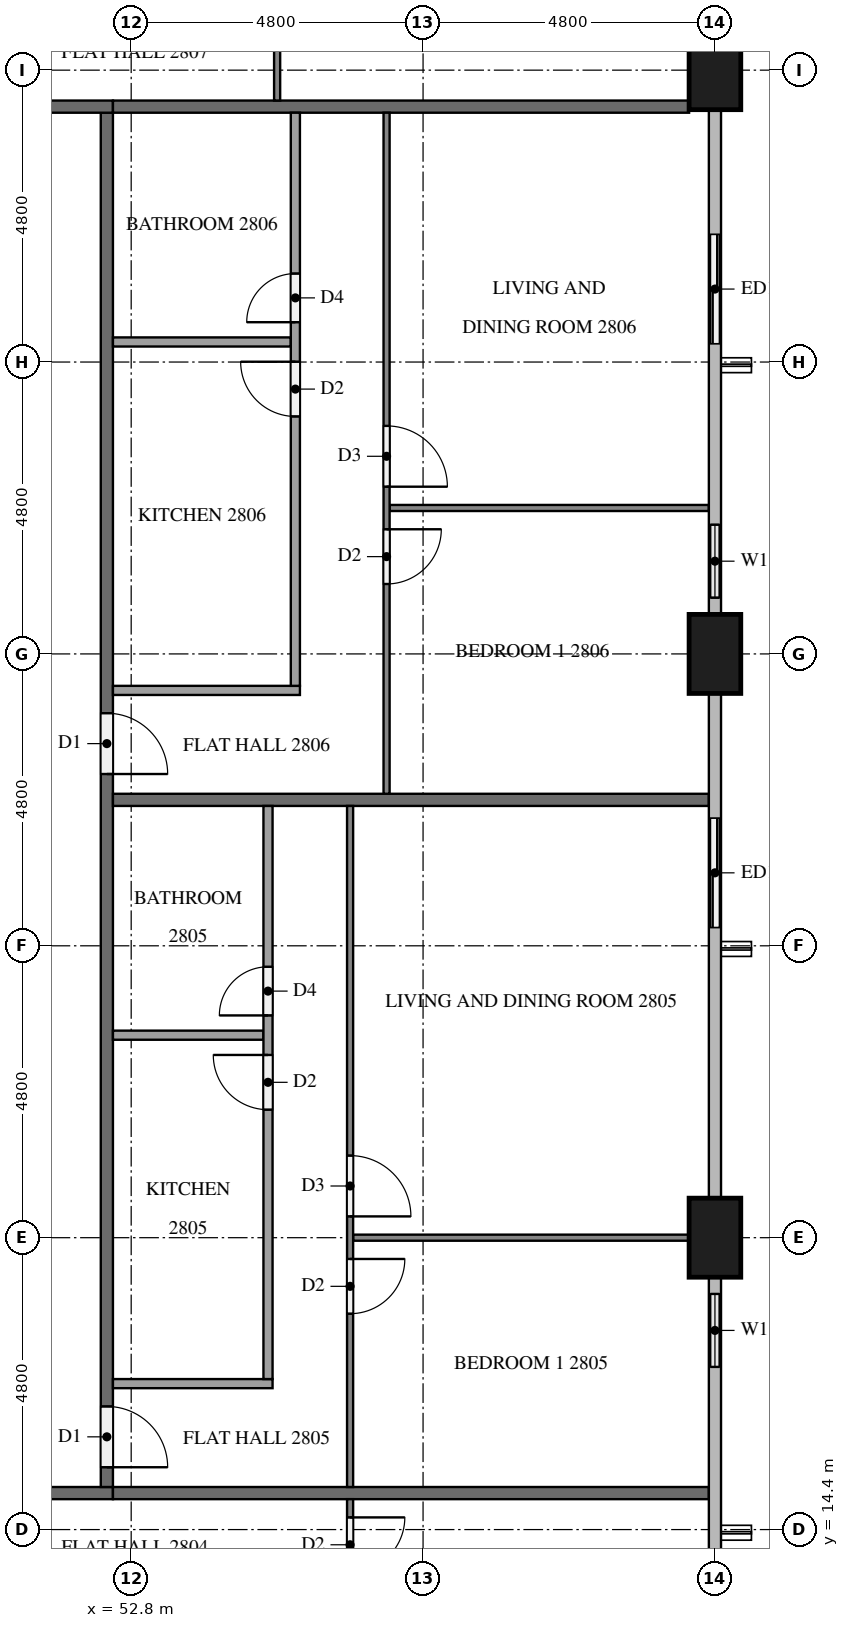
"""IFC4 building model, lengths in metres.
Left out: names, types, materials, properties, quantities, classifications, styles, units other than length and angle.
Written with IfcOpenShell. Run it as: python <this file> out.ifc"""

import sys

from ifc_helpers import new_model, si_unit, direction, frame, frame_2d, origin, origin_2d, place, context, subcontext, project, spatial, rectangle, extrude, element, fill, save


model = new_model("IFC4")
c1 = context("Model", 3, precision=1e-05, world=origin(), true_north=direction((0.0, 1.0)))
c2 = subcontext(c1, "Body", "Model", "MODEL_VIEW")
j1 = project(units=[si_unit("LENGTHUNIT", "METRE"), si_unit("PLANEANGLEUNIT", "RADIAN")], contexts=[c1])
p1 = place(None, origin())
s1 = spatial("IfcSite", under=j1, at=p1, CompositionType="ELEMENT")
p2 = place(p1, origin())
s2 = spatial("IfcBuilding", under=s1, at=p2, CompositionType="ELEMENT")
p3 = place(p2, frame((0.0, 0.0, 110.2)))
s3 = spatial("IfcBuildingStorey", under=s2, at=p3, CompositionType="ELEMENT", Elevation=110.2)
for number, where, z_axis, x_axis in (
    (1, (62.4, 19.2, 0.0), (0.0, 0.0, 1.0), (0.0, 1.0, 0.0)),
    (2, (62.4, 28.8, 0.0), (0.0, 0.0, 1.0), (0.0, 1.0, 0.0)),
    (3, (62.4, 38.4, 0.0), (0.0, 0.0, 1.0), (0.0, 1.0, 0.0)),
):
    element("IfcColumn", number, at=place(p3, frame(where, z_axis=z_axis, x_axis=x_axis)), inside=s3, PredefinedType="COLUMN", context=c2, shape_type="SweptSolid", body=[
        extrude(rectangle(XDim=1.3, YDim=0.85, at=origin_2d()), origin(), (0.0, 0.0, 1.0), 3.1),
    ])
p4 = place(p3, frame((62.4, 16.8, 0.0), z_axis=(0.0, 0.0, 1.0), x_axis=(0.0, 1.0, 0.0)))
e4 = element("IfcWall", 4, at=p4, inside=s3, PredefinedType="SOLIDWALL", context=c2, shape_type="SweptSolid", body=[
    extrude(rectangle(XDim=1.75, YDim=0.15, at=frame_2d((0.875, 0.0))), origin(), (0.0, 0.0, 1.0), 3.1),
])
p5 = place(p4, frame((0.275, 0.0, 0.9)))
e5 = element("IfcOpeningElement", 5, at=p5, cuts=e4, PredefinedType="OPENING", context=c2, shape_type="SweptSolid", body=[
    extrude(rectangle(XDim=1.2, YDim=1.4, at=frame_2d((0.6, 0.7))), frame((0.0, 0.085, 0.0), z_axis=(0.0, -1.0, 0.0), x_axis=(1.0, 0.0, 0.0)), (0.0, 0.0, 1.0), 0.17),
])
p6 = place(p3, frame((62.4, 24.0, 0.0), z_axis=(0.0, 0.0, 1.0), x_axis=(0.0, 1.0, 0.0)))
e6 = element("IfcWall", 6, at=p6, inside=s3, PredefinedType="SOLIDWALL", context=c2, shape_type="SweptSolid", body=[
    extrude(rectangle(XDim=2.4, YDim=0.15, at=frame_2d((1.2, 0.0))), origin(), (0.0, 0.0, 1.0), 3.1),
])
p7 = place(p6, frame((0.3, 0.0, 0.0)))
e7 = element("IfcOpeningElement", 7, at=p7, cuts=e6, PredefinedType="OPENING", context=c2, shape_type="SweptSolid", body=[
    extrude(rectangle(XDim=1.8, YDim=2.4, at=frame_2d((0.9, 1.2))), frame((0.0, 0.085, 0.0), z_axis=(0.0, -1.0, 0.0), x_axis=(1.0, 0.0, 0.0)), (0.0, 0.0, 1.0), 0.17),
])
p8 = place(p3, frame((62.4, 29.45, 0.0), z_axis=(0.0, 0.0, 1.0), x_axis=(0.0, 1.0, 0.0)))
e8 = element("IfcWall", 8, at=p8, inside=s3, PredefinedType="SOLIDWALL", context=c2, shape_type="SweptSolid", body=[
    extrude(rectangle(XDim=1.75, YDim=0.15, at=frame_2d((0.875, 0.0))), origin(), (0.0, 0.0, 1.0), 3.1),
])
p9 = place(p8, frame((0.275, 0.0, 0.9)))
e9 = element("IfcOpeningElement", 9, at=p9, cuts=e8, PredefinedType="OPENING", context=c2, shape_type="SweptSolid", body=[
    extrude(rectangle(XDim=1.2, YDim=1.4, at=frame_2d((0.6, 0.7))), frame((0.0, 0.085, 0.0), z_axis=(0.0, -1.0, 0.0), x_axis=(1.0, 0.0, 0.0)), (0.0, 0.0, 1.0), 0.17),
])
p10 = place(p3, frame((62.4, 33.6, 0.0), z_axis=(0.0, 0.0, 1.0), x_axis=(0.0, 1.0, 0.0)))
e10 = element("IfcWall", 10, at=p10, inside=s3, PredefinedType="SOLIDWALL", context=c2, shape_type="SweptSolid", body=[
    extrude(rectangle(XDim=2.4, YDim=0.15, at=frame_2d((1.2, 0.0))), origin(), (0.0, 0.0, 1.0), 3.1),
])
p11 = place(p10, frame((0.3, 0.0, 0.0)))
e11 = element("IfcOpeningElement", 11, at=p11, cuts=e10, PredefinedType="OPENING", context=c2, shape_type="SweptSolid", body=[
    extrude(rectangle(XDim=1.8, YDim=2.4, at=frame_2d((0.9, 1.2))), frame((0.0, 0.085, 0.0), z_axis=(0.0, -1.0, 0.0), x_axis=(1.0, 0.0, 0.0)), (0.0, 0.0, 1.0), 0.17),
])
p12 = place(p3, frame((50.3, 15.0, 0.0), z_axis=(0.0, 0.0, 1.0), x_axis=(1.0, 0.0, 0.0)))
e12 = element("IfcWall", 12, at=p12, inside=s3, PredefinedType="PARTITIONING", context=c2, shape_type="SweptSolid", body=[
    extrude(rectangle(XDim=2.2, YDim=0.2, at=frame_2d((1.1, 0.0))), origin(), (0.0, 0.0, 1.0), 3.1),
])
p13 = place(p3, frame((52.4, 37.7, 0.0), z_axis=(0.0, 0.0, 1.0), x_axis=(0.0, -1.0, 0.0)))
e13 = element("IfcWall", 13, at=p13, inside=s3, PredefinedType="PARTITIONING", context=c2, shape_type="SweptSolid", body=[
    extrude(rectangle(XDim=22.6, YDim=0.2, at=frame_2d((11.3, 0.0))), origin(), (0.0, 0.0, 1.0), 3.1),
])
p14 = place(p13, frame((21.275, 0.0, 0.0)))
e14 = element("IfcOpeningElement", 14, at=p14, cuts=e13, PredefinedType="OPENING", context=c2, shape_type="SweptSolid", body=[
    extrude(rectangle(XDim=1.0, YDim=2.1, at=frame_2d((0.5, 1.05))), frame((0.0, 0.11, 0.0), z_axis=(0.0, -1.0, 0.0), x_axis=(1.0, 0.0, 0.0)), (0.0, 0.0, 1.0), 0.22),
])
p15 = place(p13, frame((9.875, 0.0, 0.0)))
e15 = element("IfcOpeningElement", 15, at=p15, cuts=e13, PredefinedType="OPENING", context=c2, shape_type="SweptSolid", body=[
    extrude(rectangle(XDim=1.0, YDim=2.1, at=frame_2d((0.5, 1.05))), frame((0.0, 0.11, 0.0), z_axis=(0.0, -1.0, 0.0), x_axis=(1.0, 0.0, 0.0)), (0.0, 0.0, 1.0), 0.22),
])
p16 = place(p3, frame((52.5, 37.8, 0.0), z_axis=(0.0, 0.0, 1.0), x_axis=(-1.0, 0.0, 0.0)))
e16 = element("IfcWall", 16, at=p16, inside=s3, PredefinedType="PARTITIONING", context=c2, shape_type="SweptSolid", body=[
    extrude(rectangle(XDim=2.2, YDim=0.2, at=frame_2d((1.1, 0.0))), origin(), (0.0, 0.0, 1.0), 3.1),
])
for number, where, z_axis, x_axis in (
    (17, (52.5, 15.0, 0.0), (0.0, 0.0, 1.0), (1.0, 0.0, 0.0)),
    (18, (52.5, 26.4, 0.0), (0.0, 0.0, 1.0), (1.0, 0.0, 0.0)),
):
    element("IfcWall", number, at=place(p3, frame(where, z_axis=z_axis, x_axis=x_axis)), inside=s3, PredefinedType="PARTITIONING", context=c2, shape_type="SweptSolid", body=[
        extrude(rectangle(XDim=9.8, YDim=0.2, at=frame_2d((4.9, 0.0))), origin(), (0.0, 0.0, 1.0), 3.1),
    ])
p17 = place(p3, frame((52.5, 37.8, 0.0), z_axis=(0.0, 0.0, 1.0), x_axis=(1.0, 0.0, 0.0)))
e19 = element("IfcWall", 19, at=p17, inside=s3, PredefinedType="PARTITIONING", context=c2, shape_type="SweptSolid", body=[
    extrude(rectangle(XDim=9.475, YDim=0.2, at=frame_2d((4.738, 0.0))), origin(), (0.0, 0.0, 1.0), 3.1),
])
p18 = place(p3, frame((56.4, 14.9, 0.0), z_axis=(0.0, 0.0, 1.0), x_axis=(0.0, -1.0, 0.0)))
e20 = element("IfcWall", 20, at=p18, inside=s3, PredefinedType="PARTITIONING", context=c2, shape_type="SweptSolid", body=[
    extrude(rectangle(XDim=10.0, YDim=0.1, at=frame_2d((5.0, 0.0))), origin(), (0.0, 0.0, 1.0), 3.1),
])
p19 = place(p18, frame((0.3, 0.0, 0.0)))
e21 = element("IfcOpeningElement", 21, at=p19, cuts=e20, PredefinedType="OPENING", context=c2, shape_type="SweptSolid", body=[
    extrude(rectangle(XDim=0.9, YDim=2.1, at=frame_2d((0.45, 1.05))), frame((0.0, 0.06, 0.0), z_axis=(0.0, -1.0, 0.0), x_axis=(1.0, 0.0, 0.0)), (0.0, 0.0, 1.0), 0.12),
])
p20 = place(p18, frame((8.5, 0.0, 0.0)))
e22 = element("IfcOpeningElement", 22, at=p20, cuts=e20, PredefinedType="OPENING", context=c2, shape_type="SweptSolid", body=[
    extrude(rectangle(XDim=1.0, YDim=2.1, at=frame_2d((0.5, 1.05))), frame((0.0, 0.06, 0.0), z_axis=(0.0, -1.0, 0.0), x_axis=(1.0, 0.0, 0.0)), (0.0, 0.0, 1.0), 0.12),
])
p21 = place(p3, frame((56.45, 19.2, 0.0), z_axis=(0.0, 0.0, 1.0), x_axis=(1.0, 0.0, 0.0)))
e23 = element("IfcWall", 23, at=p21, inside=s3, PredefinedType="PARTITIONING", context=c2, shape_type="SweptSolid", body=[
    extrude(rectangle(XDim=5.525, YDim=0.1, at=frame_2d((2.763, 0.0))), origin(), (0.0, 0.0, 1.0), 3.1),
])
p22 = place(p3, frame((56.4, 26.3, 0.0), z_axis=(0.0, 0.0, 1.0), x_axis=(0.0, -1.0, 0.0)))
e24 = element("IfcWall", 24, at=p22, inside=s3, PredefinedType="PARTITIONING", context=c2, shape_type="SweptSolid", body=[
    extrude(rectangle(XDim=11.2, YDim=0.1, at=frame_2d((5.6, 0.0))), origin(), (0.0, 0.0, 1.0), 3.1),
])
p23 = place(p22, frame((7.45, 0.0, 0.0)))
e25 = element("IfcOpeningElement", 25, at=p23, cuts=e24, PredefinedType="OPENING", context=c2, shape_type="SweptSolid", body=[
    extrude(rectangle(XDim=0.9, YDim=2.1, at=frame_2d((0.45, 1.05))), frame((0.0, 0.06, 0.0), z_axis=(0.0, -1.0, 0.0), x_axis=(1.0, 0.0, 0.0)), (0.0, 0.0, 1.0), 0.12),
])
p24 = place(p22, frame((5.75, 0.0, 0.0)))
e26 = element("IfcOpeningElement", 26, at=p24, cuts=e24, PredefinedType="OPENING", context=c2, shape_type="SweptSolid", body=[
    extrude(rectangle(XDim=1.0, YDim=2.1, at=frame_2d((0.5, 1.05))), frame((0.0, 0.06, 0.0), z_axis=(0.0, -1.0, 0.0), x_axis=(1.0, 0.0, 0.0)), (0.0, 0.0, 1.0), 0.12),
])
p25 = place(p3, frame((52.5, 22.53, 0.0), z_axis=(0.0, 0.0, 1.0), x_axis=(1.0, 0.0, 0.0)))
e27 = element("IfcWall", 27, at=p25, inside=s3, PredefinedType="PARTITIONING", context=c2, shape_type="SweptSolid", body=[
    extrude(rectangle(XDim=2.475, YDim=0.15, at=frame_2d((1.238, 0.0))), origin(), (0.0, 0.0, 1.0), 3.1),
])
p26 = place(p3, frame((52.5, 16.8, 0.0), z_axis=(0.0, 0.0, 1.0), x_axis=(1.0, 0.0, 0.0)))
e28 = element("IfcWall", 28, at=p26, inside=s3, PredefinedType="PARTITIONING", context=c2, shape_type="SweptSolid", body=[
    extrude(rectangle(XDim=2.625, YDim=0.15, at=frame_2d((1.312, 0.0))), origin(), (0.0, 0.0, 1.0), 3.1),
])
p27 = place(p3, frame((55.05, 16.875, 0.0), z_axis=(0.0, 0.0, 1.0), x_axis=(0.0, 1.0, 0.0)))
e29 = element("IfcWall", 29, at=p27, inside=s3, PredefinedType="PARTITIONING", context=c2, shape_type="SweptSolid", body=[
    extrude(rectangle(XDim=9.425, YDim=0.15, at=frame_2d((4.712, 0.0))), origin(), (0.0, 0.0, 1.0), 3.1),
])
p28 = place(p27, frame((4.43, 0.0, 0.0)))
e30 = element("IfcOpeningElement", 30, at=p28, cuts=e29, PredefinedType="OPENING", context=c2, shape_type="SweptSolid", body=[
    extrude(rectangle(XDim=0.9, YDim=2.1, at=frame_2d((0.45, 1.05))), frame((0.0, 0.085, 0.0), z_axis=(0.0, -1.0, 0.0), x_axis=(1.0, 0.0, 0.0)), (0.0, 0.0, 1.0), 0.17),
])
p29 = place(p27, frame((5.98, 0.0, 0.0)))
e31 = element("IfcOpeningElement", 31, at=p29, cuts=e29, PredefinedType="OPENING", context=c2, shape_type="SweptSolid", body=[
    extrude(rectangle(XDim=0.8, YDim=2.1, at=frame_2d((0.4, 1.05))), frame((0.0, 0.085, 0.0), z_axis=(0.0, -1.0, 0.0), x_axis=(1.0, 0.0, 0.0)), (0.0, 0.0, 1.0), 0.17),
])
p30 = place(p3, frame((57.05, 31.2, 0.0), z_axis=(0.0, 0.0, 1.0), x_axis=(1.0, 0.0, 0.0)))
e32 = element("IfcWall", 32, at=p30, inside=s3, PredefinedType="PARTITIONING", context=c2, shape_type="SweptSolid", body=[
    extrude(rectangle(XDim=5.25, YDim=0.1, at=frame_2d((2.625, 0.0))), origin(), (0.0, 0.0, 1.0), 3.1),
])
p31 = place(p3, frame((57.0, 37.7, 0.0), z_axis=(0.0, 0.0, 1.0), x_axis=(0.0, -1.0, 0.0)))
e33 = element("IfcWall", 33, at=p31, inside=s3, PredefinedType="PARTITIONING", context=c2, shape_type="SweptSolid", body=[
    extrude(rectangle(XDim=11.2, YDim=0.1, at=frame_2d((5.6, 0.0))), origin(), (0.0, 0.0, 1.0), 3.1),
])
p32 = place(p31, frame((6.85, 0.0, 0.0)))
e34 = element("IfcOpeningElement", 34, at=p32, cuts=e33, PredefinedType="OPENING", context=c2, shape_type="SweptSolid", body=[
    extrude(rectangle(XDim=0.9, YDim=2.1, at=frame_2d((0.45, 1.05))), frame((0.0, 0.06, 0.0), z_axis=(0.0, -1.0, 0.0), x_axis=(1.0, 0.0, 0.0)), (0.0, 0.0, 1.0), 0.12),
])
p33 = place(p31, frame((5.15, 0.0, 0.0)))
e35 = element("IfcOpeningElement", 35, at=p33, cuts=e33, PredefinedType="OPENING", context=c2, shape_type="SweptSolid", body=[
    extrude(rectangle(XDim=1.0, YDim=2.1, at=frame_2d((0.5, 1.05))), frame((0.0, 0.06, 0.0), z_axis=(0.0, -1.0, 0.0), x_axis=(1.0, 0.0, 0.0)), (0.0, 0.0, 1.0), 0.12),
])
p34 = place(p3, frame((52.5, 33.93, 0.0), z_axis=(0.0, 0.0, 1.0), x_axis=(1.0, 0.0, 0.0)))
e36 = element("IfcWall", 36, at=p34, inside=s3, PredefinedType="PARTITIONING", context=c2, shape_type="SweptSolid", body=[
    extrude(rectangle(XDim=2.925, YDim=0.15, at=frame_2d((1.462, 0.0))), origin(), (0.0, 0.0, 1.0), 3.1),
])
p35 = place(p3, frame((52.5, 28.2, 0.0), z_axis=(0.0, 0.0, 1.0), x_axis=(1.0, 0.0, 0.0)))
e37 = element("IfcWall", 37, at=p35, inside=s3, PredefinedType="PARTITIONING", context=c2, shape_type="SweptSolid", body=[
    extrude(rectangle(XDim=3.075, YDim=0.15, at=frame_2d((1.538, 0.0))), origin(), (0.0, 0.0, 1.0), 3.1),
])
p36 = place(p3, frame((55.5, 28.275, 0.0), z_axis=(0.0, 0.0, 1.0), x_axis=(0.0, 1.0, 0.0)))
e38 = element("IfcWall", 38, at=p36, inside=s3, PredefinedType="PARTITIONING", context=c2, shape_type="SweptSolid", body=[
    extrude(rectangle(XDim=9.425, YDim=0.15, at=frame_2d((4.712, 0.0))), origin(), (0.0, 0.0, 1.0), 3.1),
])
p37 = place(p36, frame((4.43, 0.0, 0.0)))
e39 = element("IfcOpeningElement", 39, at=p37, cuts=e38, PredefinedType="OPENING", context=c2, shape_type="SweptSolid", body=[
    extrude(rectangle(XDim=0.9, YDim=2.1, at=frame_2d((0.45, 1.05))), frame((0.0, 0.085, 0.0), z_axis=(0.0, -1.0, 0.0), x_axis=(1.0, 0.0, 0.0)), (0.0, 0.0, 1.0), 0.17),
])
p38 = place(p36, frame((5.98, 0.0, 0.0)))
e40 = element("IfcOpeningElement", 40, at=p38, cuts=e38, PredefinedType="OPENING", context=c2, shape_type="SweptSolid", body=[
    extrude(rectangle(XDim=0.8, YDim=2.1, at=frame_2d((0.4, 1.05))), frame((0.0, 0.085, 0.0), z_axis=(0.0, -1.0, 0.0), x_axis=(1.0, 0.0, 0.0)), (0.0, 0.0, 1.0), 0.17),
])
p39 = place(p3, frame((55.2, 52.7, 0.0), z_axis=(0.0, 0.0, 1.0), x_axis=(0.0, -1.0, 0.0)))
e41 = element("IfcWall", 41, at=p39, inside=s3, PredefinedType="PARTITIONING", context=c2, shape_type="SweptSolid", body=[
    extrude(rectangle(XDim=14.8, YDim=0.1, at=frame_2d((7.4, 0.0))), origin(), (0.0, 0.0, 1.0), 3.1),
])
p40 = place(p39, frame((9.85, 0.0, 0.0)))
e42 = element("IfcOpeningElement", 42, at=p40, cuts=e41, PredefinedType="OPENING", context=c2, shape_type="SweptSolid", body=[
    extrude(rectangle(XDim=0.9, YDim=2.1, at=frame_2d((0.45, 1.05))), frame((0.0, 0.06, 0.0), z_axis=(0.0, -1.0, 0.0), x_axis=(1.0, 0.0, 0.0)), (0.0, 0.0, 1.0), 0.12),
])
p41 = place(p39, frame((8.25, 0.0, 0.0)))
e43 = element("IfcOpeningElement", 43, at=p41, cuts=e41, PredefinedType="OPENING", context=c2, shape_type="SweptSolid", body=[
    extrude(rectangle(XDim=0.9, YDim=2.1, at=frame_2d((0.45, 1.05))), frame((0.0, 0.06, 0.0), z_axis=(0.0, -1.0, 0.0), x_axis=(1.0, 0.0, 0.0)), (0.0, 0.0, 1.0), 0.12),
])
p42 = place(p39, frame((0.3, 0.0, 0.0)))
e44 = element("IfcOpeningElement", 44, at=p42, cuts=e41, PredefinedType="OPENING", context=c2, shape_type="SweptSolid", body=[
    extrude(rectangle(XDim=1.0, YDim=2.1, at=frame_2d((0.5, 1.05))), frame((0.0, 0.06, 0.0), z_axis=(0.0, -1.0, 0.0), x_axis=(1.0, 0.0, 0.0)), (0.0, 0.0, 1.0), 0.12),
])
p43 = place(p5, origin())
e45 = element("IfcWindow", 45, at=p43, inside=s3, PartitioningType="SINGLE_PANEL", PredefinedType="WINDOW", context=c2, shape_type="SweptSolid", body=[
    extrude(rectangle(XDim=1.2, YDim=1.4, at=frame_2d((0.6, 0.7))), frame((0.0, 0.03, 0.0), z_axis=(0.0, -1.0, 0.0), x_axis=(1.0, 0.0, 0.0)), (0.0, 0.0, 1.0), 0.06),
])
fill(e5, e45)
p44 = place(p7, origin())
e46 = element("IfcDoor", 46, at=p44, inside=s3, OperationType="SLIDING_TO_LEFT", PredefinedType="DOOR", context=c2, shape_type="SweptSolid", body=[
    extrude(rectangle(XDim=1.8, YDim=2.4, at=frame_2d((0.9, 1.2))), frame((0.0, 0.025, 0.0), z_axis=(0.0, -1.0, 0.0), x_axis=(1.0, 0.0, 0.0)), (0.0, 0.0, 1.0), 0.05),
])
fill(e7, e46)
p45 = place(p9, origin())
e47 = element("IfcWindow", 47, at=p45, inside=s3, PartitioningType="SINGLE_PANEL", PredefinedType="WINDOW", context=c2, shape_type="SweptSolid", body=[
    extrude(rectangle(XDim=1.2, YDim=1.4, at=frame_2d((0.6, 0.7))), frame((0.0, 0.03, 0.0), z_axis=(0.0, -1.0, 0.0), x_axis=(1.0, 0.0, 0.0)), (0.0, 0.0, 1.0), 0.06),
])
fill(e9, e47)
p46 = place(p11, origin())
e48 = element("IfcDoor", 48, at=p46, inside=s3, OperationType="SLIDING_TO_RIGHT", PredefinedType="DOOR", context=c2, shape_type="SweptSolid", body=[
    extrude(rectangle(XDim=1.8, YDim=2.4, at=frame_2d((0.9, 1.2))), frame((0.0, 0.025, 0.0), z_axis=(0.0, -1.0, 0.0), x_axis=(1.0, 0.0, 0.0)), (0.0, 0.0, 1.0), 0.05),
])
fill(e11, e48)
p47 = place(p14, origin())
e49 = element("IfcDoor", 49, at=p47, inside=s3, OperationType="SINGLE_SWING_RIGHT", PredefinedType="DOOR", context=c2, shape_type="SweptSolid", body=[
    extrude(rectangle(XDim=1.0, YDim=2.1, at=frame_2d((0.5, 1.05))), frame((0.0, 0.025, 0.0), z_axis=(0.0, -1.0, 0.0), x_axis=(1.0, 0.0, 0.0)), (0.0, 0.0, 1.0), 0.05),
])
fill(e14, e49)
p48 = place(p15, origin())
e50 = element("IfcDoor", 50, at=p48, inside=s3, OperationType="SINGLE_SWING_RIGHT", PredefinedType="DOOR", context=c2, shape_type="SweptSolid", body=[
    extrude(rectangle(XDim=1.0, YDim=2.1, at=frame_2d((0.5, 1.05))), frame((0.0, 0.025, 0.0), z_axis=(0.0, -1.0, 0.0), x_axis=(1.0, 0.0, 0.0)), (0.0, 0.0, 1.0), 0.05),
])
fill(e15, e50)
p49 = place(p19, origin())
e51 = element("IfcDoor", 51, at=p49, inside=s3, OperationType="SINGLE_SWING_LEFT", PredefinedType="DOOR", context=c2, shape_type="SweptSolid", body=[
    extrude(rectangle(XDim=0.9, YDim=2.1, at=frame_2d((0.45, 1.05))), frame((0.0, 0.025, 0.0), z_axis=(0.0, -1.0, 0.0), x_axis=(1.0, 0.0, 0.0)), (0.0, 0.0, 1.0), 0.05),
])
fill(e21, e51)
p50 = place(p23, origin())
e52 = element("IfcDoor", 52, at=p50, inside=s3, OperationType="SINGLE_SWING_LEFT", PredefinedType="DOOR", context=c2, shape_type="SweptSolid", body=[
    extrude(rectangle(XDim=0.9, YDim=2.1, at=frame_2d((0.45, 1.05))), frame((0.0, 0.025, 0.0), z_axis=(0.0, -1.0, 0.0), x_axis=(1.0, 0.0, 0.0)), (0.0, 0.0, 1.0), 0.05),
])
fill(e25, e52)
p51 = place(p24, origin())
e53 = element("IfcDoor", 53, at=p51, inside=s3, OperationType="SINGLE_SWING_RIGHT", PredefinedType="DOOR", context=c2, shape_type="SweptSolid", body=[
    extrude(rectangle(XDim=1.0, YDim=2.1, at=frame_2d((0.5, 1.05))), frame((0.0, 0.025, 0.0), z_axis=(0.0, -1.0, 0.0), x_axis=(1.0, 0.0, 0.0)), (0.0, 0.0, 1.0), 0.05),
])
fill(e26, e53)
p52 = place(p28, origin())
e54 = element("IfcDoor", 54, at=p52, inside=s3, OperationType="SINGLE_SWING_RIGHT", PredefinedType="DOOR", context=c2, shape_type="SweptSolid", body=[
    extrude(rectangle(XDim=0.9, YDim=2.1, at=frame_2d((0.45, 1.05))), frame((0.0, 0.025, 0.0), z_axis=(0.0, -1.0, 0.0), x_axis=(1.0, 0.0, 0.0)), (0.0, 0.0, 1.0), 0.05),
])
fill(e30, e54)
p53 = place(p29, origin())
e55 = element("IfcDoor", 55, at=p53, inside=s3, OperationType="SINGLE_SWING_LEFT", PredefinedType="DOOR", context=c2, shape_type="SweptSolid", body=[
    extrude(rectangle(XDim=0.8, YDim=2.1, at=frame_2d((0.4, 1.05))), frame((0.0, 0.025, 0.0), z_axis=(0.0, -1.0, 0.0), x_axis=(1.0, 0.0, 0.0)), (0.0, 0.0, 1.0), 0.05),
])
fill(e31, e55)
p54 = place(p32, origin())
e56 = element("IfcDoor", 56, at=p54, inside=s3, OperationType="SINGLE_SWING_LEFT", PredefinedType="DOOR", context=c2, shape_type="SweptSolid", body=[
    extrude(rectangle(XDim=0.9, YDim=2.1, at=frame_2d((0.45, 1.05))), frame((0.0, 0.025, 0.0), z_axis=(0.0, -1.0, 0.0), x_axis=(1.0, 0.0, 0.0)), (0.0, 0.0, 1.0), 0.05),
])
fill(e34, e56)
p55 = place(p33, origin())
e57 = element("IfcDoor", 57, at=p55, inside=s3, OperationType="SINGLE_SWING_RIGHT", PredefinedType="DOOR", context=c2, shape_type="SweptSolid", body=[
    extrude(rectangle(XDim=1.0, YDim=2.1, at=frame_2d((0.5, 1.05))), frame((0.0, 0.025, 0.0), z_axis=(0.0, -1.0, 0.0), x_axis=(1.0, 0.0, 0.0)), (0.0, 0.0, 1.0), 0.05),
])
fill(e35, e57)
p56 = place(p37, origin())
e58 = element("IfcDoor", 58, at=p56, inside=s3, OperationType="SINGLE_SWING_RIGHT", PredefinedType="DOOR", context=c2, shape_type="SweptSolid", body=[
    extrude(rectangle(XDim=0.9, YDim=2.1, at=frame_2d((0.45, 1.05))), frame((0.0, 0.025, 0.0), z_axis=(0.0, -1.0, 0.0), x_axis=(1.0, 0.0, 0.0)), (0.0, 0.0, 1.0), 0.05),
])
fill(e39, e58)
p57 = place(p38, origin())
e59 = element("IfcDoor", 59, at=p57, inside=s3, OperationType="SINGLE_SWING_LEFT", PredefinedType="DOOR", context=c2, shape_type="SweptSolid", body=[
    extrude(rectangle(XDim=0.8, YDim=2.1, at=frame_2d((0.4, 1.05))), frame((0.0, 0.025, 0.0), z_axis=(0.0, -1.0, 0.0), x_axis=(1.0, 0.0, 0.0)), (0.0, 0.0, 1.0), 0.05),
])
fill(e40, e59)
save(model, sys.argv[1])
